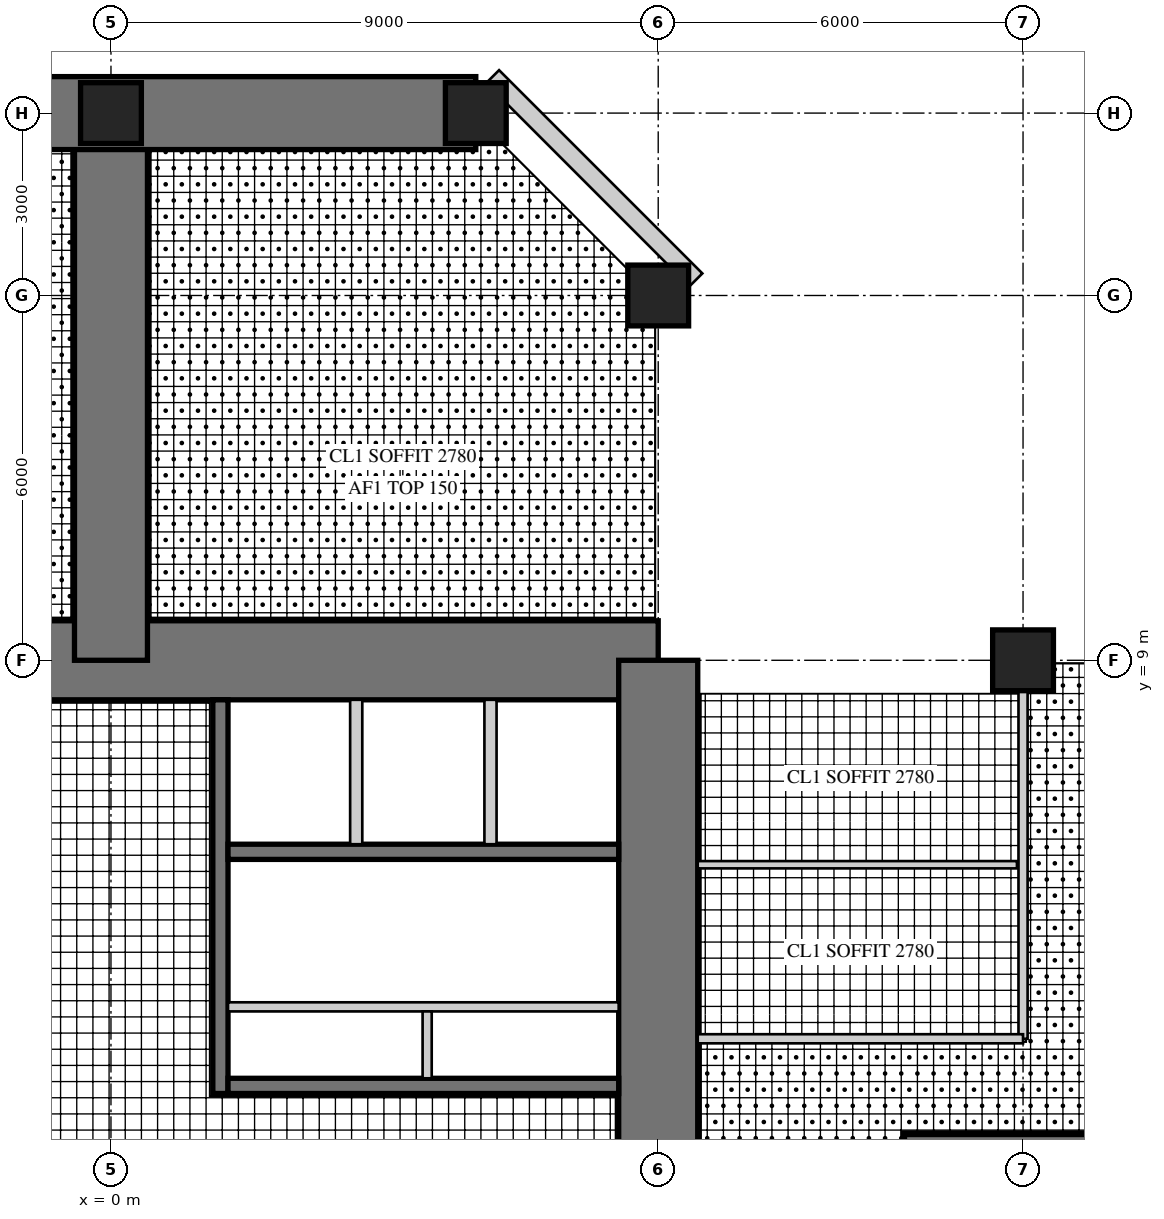
"""IFC4 building model, lengths in metres.
Left out: names, types, materials, properties, quantities, classifications, styles, units other than length and angle.
Written with IfcOpenShell. Run it as: python <this file> out.ifc"""

import sys

from ifc_helpers import new_model, si_unit, direction, frame, frame_2d, origin, origin_2d, place, context, subcontext, project, spatial, rectangle, hollow_rectangle, extrude, element, fill, save


model = new_model("IFC4")
c1 = context("Model", 3, precision=1e-05, world=origin(), true_north=direction((0.0, 1.0)))
c2 = subcontext(c1, "Body", "Model", "MODEL_VIEW")
j1 = project(units=[si_unit("LENGTHUNIT", "METRE"), si_unit("PLANEANGLEUNIT", "RADIAN")], contexts=[c1])
p1 = place(None, origin())
s1 = spatial("IfcSite", under=j1, at=p1, CompositionType="ELEMENT")
p2 = place(p1, origin())
s2 = spatial("IfcBuilding", under=s1, at=p2, CompositionType="ELEMENT")
p3 = place(p2, frame((0.0, 0.0, 152.5)))
s3 = spatial("IfcBuildingStorey", under=s2, at=p3, CompositionType="ELEMENT", Elevation=152.5)
p4 = place(p3, frame((9.0, 9.0, 0.0), z_axis=(0.0, 0.0, 1.0), x_axis=(-1.0, 0.0, 0.0)))
e1 = element("IfcWall", 1, at=p4, inside=s3, PredefinedType="SHEAR", context=c2, shape_type="SweptSolid", body=[
    extrude(rectangle(XDim=18.0, YDim=1.3, at=frame_2d((9.0, 0.0))), origin(), (0.0, 0.0, 1.0), 4.0),
])
p5 = place(p4, frame((9.8, 0.0, 0.0)))
e2 = element("IfcOpeningElement", 2, at=p5, cuts=e1, PredefinedType="OPENING", context=c2, shape_type="SweptSolid", body=[
    extrude(rectangle(XDim=1.0, YDim=2.4, at=frame_2d((0.5, 1.2))), frame((0.0, 0.66, 0.0), z_axis=(0.0, -1.0, 0.0), x_axis=(1.0, 0.0, 0.0)), (0.0, 0.0, 1.0), 1.32),
])
p6 = place(p3, frame((9.0, -9.0, 0.0), z_axis=(0.0, 0.0, 1.0), x_axis=(0.0, 1.0, 0.0)))
e3 = element("IfcWall", 3, at=p6, inside=s3, PredefinedType="SHEAR", context=c2, shape_type="SweptSolid", body=[
    extrude(rectangle(XDim=18.0, YDim=1.3, at=frame_2d((9.0, 0.0))), origin(), (0.0, 0.0, 1.0), 4.0),
])
p7 = place(p6, frame((9.8, 0.0, 0.0)))
e4 = element("IfcOpeningElement", 4, at=p7, cuts=e3, PredefinedType="OPENING", context=c2, shape_type="SweptSolid", body=[
    extrude(rectangle(XDim=1.0, YDim=2.4, at=frame_2d((0.5, 1.2))), frame((0.0, 0.66, 0.0), z_axis=(0.0, -1.0, 0.0), x_axis=(1.0, 0.0, 0.0)), (0.0, 0.0, 1.0), 1.32),
])
p8 = place(p3, frame((1.8, 1.875, 0.0), z_axis=(0.0, 0.0, 1.0), x_axis=(0.0, 1.0, 0.0)))
e5 = element("IfcWall", 5, at=p8, inside=s3, PredefinedType="SHEAR", context=c2, shape_type="SweptSolid", body=[
    extrude(rectangle(XDim=6.475, YDim=0.25, at=frame_2d((3.238, 0.0))), origin(), (0.0, 0.0, 1.0), 4.0),
])
p9 = place(p8, frame((1.875, 0.0, 0.0)))
e6 = element("IfcOpeningElement", 6, at=p9, cuts=e5, PredefinedType="OPENING", context=c2, shape_type="SweptSolid", body=[
    extrude(rectangle(XDim=1.6, YDim=2.4, at=frame_2d((0.8, 1.2))), frame((0.0, 0.135, 0.0), z_axis=(0.0, -1.0, 0.0), x_axis=(1.0, 0.0, 0.0)), (0.0, 0.0, 1.0), 0.27),
])
p10 = place(p3, frame((1.925, 2.0, 0.0), z_axis=(0.0, 0.0, 1.0), x_axis=(1.0, 0.0, 0.0)))
e7 = element("IfcWall", 7, at=p10, inside=s3, PredefinedType="SHEAR", context=c2, shape_type="SweptSolid", body=[
    extrude(rectangle(XDim=6.425, YDim=0.25, at=frame_2d((3.212, 0.0))), origin(), (0.0, 0.0, 1.0), 4.0),
])
p11 = place(p3, frame((1.925, 5.85, 0.0), z_axis=(0.0, 0.0, 1.0), x_axis=(1.0, 0.0, 0.0)))
e8 = element("IfcWall", 8, at=p11, inside=s3, PredefinedType="SHEAR", context=c2, shape_type="SweptSolid", body=[
    extrude(rectangle(XDim=6.425, YDim=0.25, at=frame_2d((3.212, 0.0))), origin(), (0.0, 0.0, 1.0), 4.0),
])
p12 = place(p11, frame((0.454, 0.0, 0.0)))
e9 = element("IfcOpeningElement", 9, at=p12, cuts=e8, PredefinedType="OPENING", context=c2, shape_type="SweptSolid", body=[
    extrude(rectangle(XDim=1.1, YDim=2.2, at=frame_2d((0.55, 1.1))), frame((0.0, 0.135, 0.0), z_axis=(0.0, -1.0, 0.0), x_axis=(1.0, 0.0, 0.0)), (0.0, 0.0, 1.0), 0.27),
])
p13 = place(p11, frame((2.663, 0.0, 0.0)))
e10 = element("IfcOpeningElement", 10, at=p13, cuts=e8, PredefinedType="OPENING", context=c2, shape_type="SweptSolid", body=[
    extrude(rectangle(XDim=1.1, YDim=2.2, at=frame_2d((0.55, 1.1))), frame((0.0, 0.135, 0.0), z_axis=(0.0, -1.0, 0.0), x_axis=(1.0, 0.0, 0.0)), (0.0, 0.0, 1.0), 0.27),
])
p14 = place(p11, frame((4.871, 0.0, 0.0)))
e11 = element("IfcOpeningElement", 11, at=p14, cuts=e8, PredefinedType="OPENING", context=c2, shape_type="SweptSolid", body=[
    extrude(rectangle(XDim=1.1, YDim=2.2, at=frame_2d((0.55, 1.1))), frame((0.0, 0.135, 0.0), z_axis=(0.0, -1.0, 0.0), x_axis=(1.0, 0.0, 0.0)), (0.0, 0.0, 1.0), 0.27),
])
p15 = place(p3, frame((1.925, 3.3, 0.0), z_axis=(0.0, 0.0, 1.0), x_axis=(1.0, 0.0, 0.0)))
e12 = element("IfcWall", 12, at=p15, inside=s3, PredefinedType="PARTITIONING", context=c2, shape_type="SweptSolid", body=[
    extrude(rectangle(XDim=6.425, YDim=0.15, at=frame_2d((3.212, 0.0))), origin(), (0.0, 0.0, 1.0), 4.0),
])
p16 = place(p15, frame((0.075, 0.0, 0.0)))
e13 = element("IfcOpeningElement", 13, at=p16, cuts=e12, PredefinedType="OPENING", context=c2, shape_type="SweptSolid", body=[
    extrude(rectangle(XDim=0.8, YDim=2.1, at=frame_2d((0.4, 1.05))), frame((0.0, 0.085, 0.0), z_axis=(0.0, -1.0, 0.0), x_axis=(1.0, 0.0, 0.0)), (0.0, 0.0, 1.0), 0.17),
])
p17 = place(p15, frame((3.675, 0.0, 0.0)))
e14 = element("IfcOpeningElement", 14, at=p17, cuts=e12, PredefinedType="OPENING", context=c2, shape_type="SweptSolid", body=[
    extrude(rectangle(XDim=0.8, YDim=2.1, at=frame_2d((0.4, 1.05))), frame((0.0, 0.085, 0.0), z_axis=(0.0, -1.0, 0.0), x_axis=(1.0, 0.0, 0.0)), (0.0, 0.0, 1.0), 0.17),
])
p18 = place(p3, frame((5.2, 2.125, 0.0), z_axis=(0.0, 0.0, 1.0), x_axis=(0.0, 1.0, 0.0)))
e15 = element("IfcWall", 15, at=p18, inside=s3, PredefinedType="PARTITIONING", context=c2, shape_type="SweptSolid", body=[
    extrude(rectangle(XDim=1.1, YDim=0.15, at=frame_2d((0.55, 0.0))), origin(), (0.0, 0.0, 1.0), 4.0),
])
for number, where, z_axis, x_axis in (
    (16, (4.033, 5.975, 0.0), (0.0, 0.0, 1.0), (0.0, 1.0, 0.0)),
    (17, (6.242, 5.975, 0.0), (0.0, 0.0, 1.0), (0.0, 1.0, 0.0)),
):
    element("IfcWall", number, at=place(p3, frame(where, z_axis=z_axis, x_axis=x_axis)), inside=s3, PredefinedType="PARTITIONING", context=c2, shape_type="SweptSolid", body=[
        extrude(rectangle(XDim=2.375, YDim=0.2, at=frame_2d((1.188, 0.0))), origin(), (0.0, 0.0, 1.0), 4.0),
    ])
p19 = place(p3, frame((0.0, 9.0, 0.0), z_axis=(0.0, 0.0, 1.0), x_axis=(0.0, 1.0, 0.0)))
e18 = element("IfcWall", 18, at=p19, inside=s3, PredefinedType="SHEAR", context=c2, shape_type="SweptSolid", body=[
    extrude(rectangle(XDim=9.0, YDim=1.2, at=frame_2d((4.5, 0.0))), origin(), (0.0, 0.0, 1.0), 4.0),
])
p20 = place(p19, frame((4.3, 0.0, 0.0)))
e19 = element("IfcOpeningElement", 19, at=p20, cuts=e18, PredefinedType="OPENING", context=c2, shape_type="SweptSolid", body=[
    extrude(rectangle(XDim=1.0, YDim=2.2, at=frame_2d((0.5, 1.1))), frame((0.0, 0.61, 0.0), z_axis=(0.0, -1.0, 0.0), x_axis=(1.0, 0.0, 0.0)), (0.0, 0.0, 1.0), 1.22),
])
p21 = place(p3, frame((6.0, 18.0, 0.0), z_axis=(0.0, 0.0, 1.0), x_axis=(-1.0, 0.0, 0.0)))
e20 = element("IfcWall", 20, at=p21, inside=s3, PredefinedType="SHEAR", context=c2, shape_type="SweptSolid", body=[
    extrude(rectangle(XDim=12.0, YDim=1.2, at=frame_2d((6.0, 0.0))), origin(), (0.0, 0.0, 1.0), 4.0),
])
p22 = place(p21, frame((1.55, 0.0, 0.6)))
e21 = element("IfcOpeningElement", 21, at=p22, cuts=e20, PredefinedType="OPENING", context=c2, shape_type="SweptSolid", body=[
    extrude(rectangle(XDim=3.0, YDim=2.4, at=frame_2d((1.5, 1.2))), frame((0.0, 0.61, 0.0), z_axis=(0.0, -1.0, 0.0), x_axis=(1.0, 0.0, 0.0)), (0.0, 0.0, 1.0), 1.22),
])
p23 = place(p21, frame((7.45, 0.0, 0.6)))
e22 = element("IfcOpeningElement", 22, at=p23, cuts=e20, PredefinedType="OPENING", context=c2, shape_type="SweptSolid", body=[
    extrude(rectangle(XDim=3.0, YDim=2.4, at=frame_2d((1.5, 1.2))), frame((0.0, 0.61, 0.0), z_axis=(0.0, -1.0, 0.0), x_axis=(1.0, 0.0, 0.0)), (0.0, 0.0, 1.0), 1.22),
])
p24 = place(p3, frame((13.05, 0.0, 0.0), z_axis=(0.0, 0.0, 1.0), x_axis=(1.0, 0.0, 0.0)))
e23 = element("IfcWall", 23, at=p24, inside=s3, PredefinedType="SHEAR", context=c2, shape_type="SweptSolid", body=[
    extrude(rectangle(XDim=13.95, YDim=2.4, at=frame_2d((6.975, 0.0))), origin(), (0.0, 0.0, 1.0), 4.0),
])
p25 = place(p24, frame((5.75, 0.0, 0.0)))
e24 = element("IfcOpeningElement", 24, at=p25, cuts=e23, PredefinedType="OPENING", context=c2, shape_type="SweptSolid", body=[
    extrude(rectangle(XDim=1.0, YDim=2.2, at=frame_2d((0.5, 1.1))), frame((0.0, 1.21, 0.0), z_axis=(0.0, -1.0, 0.0), x_axis=(1.0, 0.0, 0.0)), (0.0, 0.0, 1.0), 2.42),
])
for number, where, z_axis, x_axis in (
    (25, (9.0, 15.0, 0.0), (0.0, 0.0, 1.0), (1.0, 0.0, 0.0)),
    (26, (6.0, 18.0, 0.0), (0.0, 0.0, 1.0), (1.0, 0.0, 0.0)),
    (27, (0.0, 18.0, 0.0), (0.0, 0.0, 1.0), (1.0, 0.0, 0.0)),
    (28, (15.0, 9.0, 0.0), (0.0, 0.0, 1.0), (1.0, 0.0, 0.0)),
):
    element("IfcColumn", number, at=place(p3, frame(where, z_axis=z_axis, x_axis=x_axis)), inside=s3, PredefinedType="COLUMN", context=c2, shape_type="SweptSolid", body=[
        extrude(rectangle(XDim=1.0, YDim=1.0, at=origin_2d()), origin(), (0.0, 0.0, 1.0), 4.0),
    ])
p26 = place(p3, frame((9.62, 15.257, 0.0), z_axis=(0.0, 0.0, 1.0), x_axis=(-0.707106781187, 0.707106781187, 0.0)))
e29 = element("IfcWall", 29, at=p26, inside=s3, PredefinedType="SOLIDWALL", context=c2, shape_type="SweptSolid", body=[
    extrude(rectangle(XDim=4.728, YDim=0.3, at=frame_2d((2.364, 0.0))), origin(), (0.0, 0.0, 1.0), 3.8),
])
p27 = place(p26, frame((1.914, 0.0, 0.3)))
e30 = element("IfcOpeningElement", 30, at=p27, cuts=e29, PredefinedType="OPENING", context=c2, shape_type="SweptSolid", body=[
    extrude(rectangle(XDim=0.9, YDim=2.4, at=frame_2d((0.45, 1.2))), frame((0.0, 0.16, 0.0), z_axis=(0.0, -1.0, 0.0), x_axis=(1.0, 0.0, 0.0)), (0.0, 0.0, 1.0), 0.32),
])
p28 = place(p3, frame((15.0, 2.775, 0.0), z_axis=(0.0, 0.0, 1.0), x_axis=(0.0, 1.0, 0.0)))
e31 = element("IfcWall", 31, at=p28, inside=s3, PredefinedType="PARTITIONING", context=c2, shape_type="SweptSolid", body=[
    extrude(rectangle(XDim=5.725, YDim=0.15, at=frame_2d((2.863, 0.0))), origin(), (0.0, 0.0, 1.0), 3.0),
])
p29 = place(p28, frame((0.931, 0.0, 0.0)))
e32 = element("IfcOpeningElement", 32, at=p29, cuts=e31, PredefinedType="OPENING", context=c2, shape_type="SweptSolid", body=[
    extrude(rectangle(XDim=1.0, YDim=2.1, at=frame_2d((0.5, 1.05))), frame((0.0, 0.085, 0.0), z_axis=(0.0, -1.0, 0.0), x_axis=(1.0, 0.0, 0.0)), (0.0, 0.0, 1.0), 0.17),
])
p30 = place(p28, frame((3.794, 0.0, 0.0)))
e33 = element("IfcOpeningElement", 33, at=p30, cuts=e31, PredefinedType="OPENING", context=c2, shape_type="SweptSolid", body=[
    extrude(rectangle(XDim=1.0, YDim=2.1, at=frame_2d((0.5, 1.05))), frame((0.0, 0.085, 0.0), z_axis=(0.0, -1.0, 0.0), x_axis=(1.0, 0.0, 0.0)), (0.0, 0.0, 1.0), 0.17),
])
p31 = place(p3, frame((9.65, 2.775, 0.0), z_axis=(0.0, 0.0, 1.0), x_axis=(1.0, 0.0, 0.0)))
e34 = element("IfcWall", 34, at=p31, inside=s3, PredefinedType="PARTITIONING", context=c2, shape_type="SweptSolid", body=[
    extrude(rectangle(XDim=5.35, YDim=0.15, at=frame_2d((2.675, 0.0))), origin(), (0.0, 0.0, 1.0), 3.8),
])
p32 = place(p3, frame((9.65, 5.637, 0.0), z_axis=(0.0, 0.0, 1.0), x_axis=(1.0, 0.0, 0.0)))
e35 = element("IfcWall", 35, at=p32, inside=s3, PredefinedType="PLUMBINGWALL", context=c2, shape_type="SweptSolid", body=[
    extrude(rectangle(XDim=5.25, YDim=0.12, at=frame_2d((2.625, 0.0))), origin(), (0.0, 0.0, 1.0), 3.8),
])
p33 = place(p27, origin())
e36 = element("IfcWindow", 36, at=p33, inside=s3, PartitioningType="SINGLE_PANEL", PredefinedType="WINDOW", context=c2, shape_type="SweptSolid", body=[
    extrude(hollow_rectangle(XDim=0.9, YDim=2.4, WallThickness=0.06, at=frame_2d((0.45, 1.2))), frame((0.0, 0.03, 0.0), z_axis=(0.0, -1.0, 0.0), x_axis=(1.0, 0.0, 0.0)), (0.0, 0.0, 1.0), 0.06),
    extrude(rectangle(XDim=0.779, YDim=2.279, at=frame_2d((0.45, 1.2))), frame((0.0, 0.03, 0.0), z_axis=(0.0, -1.0, 0.0), x_axis=(1.0, 0.0, 0.0)), (0.0, 0.0, 1.0), 0.06),
])
fill(e30, e36)
p34 = place(p22, origin())
e37 = element("IfcWindow", 37, at=p34, inside=s3, PartitioningType="SINGLE_PANEL", PredefinedType="WINDOW", context=c2, shape_type="SweptSolid", body=[
    extrude(hollow_rectangle(XDim=3.0, YDim=2.4, WallThickness=0.06, at=frame_2d((1.5, 1.2))), frame((0.0, 0.03, 0.0), z_axis=(0.0, -1.0, 0.0), x_axis=(1.0, 0.0, 0.0)), (0.0, 0.0, 1.0), 0.06),
    extrude(rectangle(XDim=2.879, YDim=2.279, at=frame_2d((1.5, 1.2))), frame((0.0, 0.03, 0.0), z_axis=(0.0, -1.0, 0.0), x_axis=(1.0, 0.0, 0.0)), (0.0, 0.0, 1.0), 0.06),
])
fill(e21, e37)
p35 = place(p29, origin())
e38 = element("IfcDoor", 38, at=p35, inside=s3, OperationType="SINGLE_SWING_LEFT", PredefinedType="DOOR", context=c2, shape_type="SweptSolid", body=[
    extrude(rectangle(XDim=1.0, YDim=2.1, at=frame_2d((0.5, 1.05))), frame((0.0, 0.025, 0.0), z_axis=(0.0, -1.0, 0.0), x_axis=(1.0, 0.0, 0.0)), (0.0, 0.0, 1.0), 0.05),
])
fill(e32, e38)
p36 = place(p30, origin())
e39 = element("IfcDoor", 39, at=p36, inside=s3, OperationType="SINGLE_SWING_LEFT", PredefinedType="DOOR", context=c2, shape_type="SweptSolid", body=[
    extrude(rectangle(XDim=1.0, YDim=2.1, at=frame_2d((0.5, 1.05))), frame((0.0, 0.025, 0.0), z_axis=(0.0, -1.0, 0.0), x_axis=(1.0, 0.0, 0.0)), (0.0, 0.0, 1.0), 0.05),
])
fill(e33, e39)
p37 = place(p20, origin())
e40 = element("IfcDoor", 40, at=p37, inside=s3, OperationType="SINGLE_SWING_RIGHT", PredefinedType="DOOR", context=c2, shape_type="SweptSolid", body=[
    extrude(rectangle(XDim=1.0, YDim=2.2, at=frame_2d((0.5, 1.1))), frame((0.0, 0.025, 0.0), z_axis=(0.0, -1.0, 0.0), x_axis=(1.0, 0.0, 0.0)), (0.0, 0.0, 1.0), 0.05),
])
fill(e19, e40)
p38 = place(p5, frame((1.0, 0.0, 0.0), z_axis=(0.0, 0.0, 1.0), x_axis=(-1.0, 0.0, 0.0)))
e41 = element("IfcDoor", 41, at=p38, inside=s3, OperationType="SINGLE_SWING_RIGHT", PredefinedType="DOOR", context=c2, shape_type="SweptSolid", body=[
    extrude(rectangle(XDim=1.0, YDim=2.4, at=frame_2d((0.5, 1.2))), frame((0.0, -0.005, 0.0), z_axis=(0.0, -1.0, 0.0), x_axis=(1.0, 0.0, 0.0)), (0.0, 0.0, 1.0), 0.05),
])
fill(e2, e41)
p39 = place(p7, frame((1.0, 0.0, 0.0), z_axis=(0.0, 0.0, 1.0), x_axis=(-1.0, 0.0, 0.0)))
e42 = element("IfcDoor", 42, at=p39, inside=s3, OperationType="SINGLE_SWING_RIGHT", PredefinedType="DOOR", context=c2, shape_type="SweptSolid", body=[
    extrude(rectangle(XDim=1.0, YDim=2.4, at=frame_2d((0.5, 1.2))), frame((0.0, -0.005, 0.0), z_axis=(0.0, -1.0, 0.0), x_axis=(1.0, 0.0, 0.0)), (0.0, 0.0, 1.0), 0.05),
])
fill(e4, e42)
p40 = place(p12, origin())
e43 = element("IfcDoor", 43, at=p40, inside=s3, OperationType="DOUBLE_DOOR_SLIDING", PredefinedType="DOOR", context=c2, shape_type="SweptSolid", body=[
    extrude(rectangle(XDim=1.1, YDim=2.2, at=frame_2d((0.55, 1.1))), frame((0.0, 0.025, 0.0), z_axis=(0.0, -1.0, 0.0), x_axis=(1.0, 0.0, 0.0)), (0.0, 0.0, 1.0), 0.05),
])
fill(e9, e43)
p41 = place(p13, origin())
e44 = element("IfcDoor", 44, at=p41, inside=s3, OperationType="DOUBLE_DOOR_SLIDING", PredefinedType="DOOR", context=c2, shape_type="SweptSolid", body=[
    extrude(rectangle(XDim=1.1, YDim=2.2, at=frame_2d((0.55, 1.1))), frame((0.0, 0.025, 0.0), z_axis=(0.0, -1.0, 0.0), x_axis=(1.0, 0.0, 0.0)), (0.0, 0.0, 1.0), 0.05),
])
fill(e10, e44)
p42 = place(p14, origin())
e45 = element("IfcDoor", 45, at=p42, inside=s3, OperationType="DOUBLE_DOOR_SLIDING", PredefinedType="DOOR", context=c2, shape_type="SweptSolid", body=[
    extrude(rectangle(XDim=1.1, YDim=2.2, at=frame_2d((0.55, 1.1))), frame((0.0, 0.025, 0.0), z_axis=(0.0, -1.0, 0.0), x_axis=(1.0, 0.0, 0.0)), (0.0, 0.0, 1.0), 0.05),
])
fill(e11, e45)
p43 = place(p9, origin())
e46 = element("IfcDoor", 46, at=p43, inside=s3, OperationType="DOUBLE_DOOR_DOUBLE_SWING", PredefinedType="DOOR", context=c2, shape_type="SweptSolid", body=[
    extrude(rectangle(XDim=1.6, YDim=2.4, at=frame_2d((0.8, 1.2))), frame((0.0, 0.025, 0.0), z_axis=(0.0, -1.0, 0.0), x_axis=(1.0, 0.0, 0.0)), (0.0, 0.0, 1.0), 0.05),
])
fill(e6, e46)
p44 = place(p16, frame((0.8, 0.0, 0.0), z_axis=(0.0, 0.0, 1.0), x_axis=(-1.0, 0.0, 0.0)))
e47 = element("IfcDoor", 47, at=p44, inside=s3, OperationType="SINGLE_SWING_RIGHT", PredefinedType="DOOR", context=c2, shape_type="SweptSolid", body=[
    extrude(rectangle(XDim=0.8, YDim=2.1, at=frame_2d((0.4, 1.05))), frame((0.0, 0.025, 0.0), z_axis=(0.0, -1.0, 0.0), x_axis=(1.0, 0.0, 0.0)), (0.0, 0.0, 1.0), 0.05),
])
fill(e13, e47)
p45 = place(p17, frame((0.8, 0.0, 0.0), z_axis=(0.0, 0.0, 1.0), x_axis=(-1.0, 0.0, 0.0)))
e48 = element("IfcDoor", 48, at=p45, inside=s3, OperationType="SINGLE_SWING_RIGHT", PredefinedType="DOOR", context=c2, shape_type="SweptSolid", body=[
    extrude(rectangle(XDim=0.8, YDim=2.1, at=frame_2d((0.4, 1.05))), frame((0.0, 0.025, 0.0), z_axis=(0.0, -1.0, 0.0), x_axis=(1.0, 0.0, 0.0)), (0.0, 0.0, 1.0), 0.05),
])
fill(e14, e48)
save(model, sys.argv[1])
